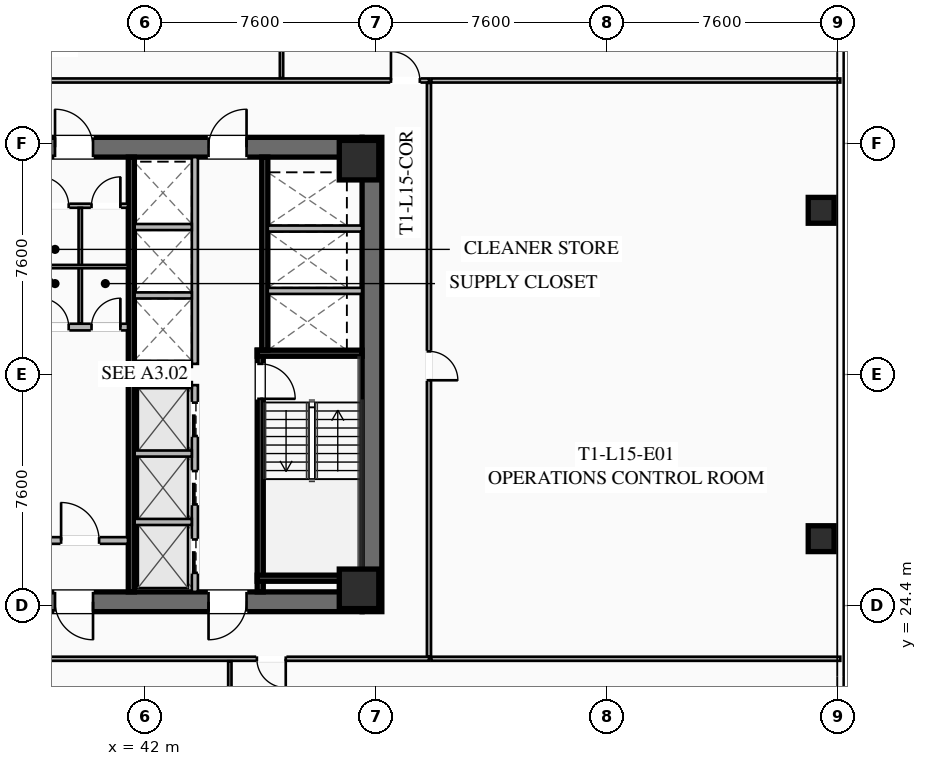
"""IFC4 building model, lengths in metres.
Left out: names, types, materials, properties, quantities, classifications, styles, units other than length and angle.
Written with IfcOpenShell. Run it as: python <this file> out.ifc"""

import sys

from ifc_helpers import new_model, si_unit, direction, frame, frame_2d, origin, origin_2d, place, context, subcontext, project, spatial, rectangle, hollow_rectangle, extrude, element, fill, save


model = new_model("IFC4")
c1 = context("Model", 3, precision=1e-05, world=origin(), true_north=direction((0.0, 1.0)))
c2 = subcontext(c1, "Body", "Model", "MODEL_VIEW")
j1 = project(units=[si_unit("LENGTHUNIT", "METRE"), si_unit("PLANEANGLEUNIT", "RADIAN")], contexts=[c1])
p1 = place(None, origin())
s1 = spatial("IfcSite", under=j1, at=p1, CompositionType="ELEMENT")
p2 = place(p1, origin())
s2 = spatial("IfcBuilding", under=s1, at=p2, CompositionType="ELEMENT")
p3 = place(p2, frame((0.0, 0.0, 60.1)))
s3 = spatial("IfcBuildingStorey", under=s2, at=p3, CompositionType="ELEMENT", Elevation=60.1)
p4 = place(p3, frame((49.475, 39.8, 0.0), z_axis=(0.0, 0.0, 1.0), x_axis=(0.0, -1.0, 0.0)))
e1 = element("IfcWall", 1, at=p4, inside=s3, PredefinedType="SHEAR", context=c2, shape_type="SweptSolid", body=[
    extrude(rectangle(XDim=15.6, YDim=0.65, at=frame_2d((7.8, 0.0))), origin(), (0.0, 0.0, 1.0), 3.55),
])
p5 = place(p3, frame((49.15, 24.525, 0.0), z_axis=(0.0, 0.0, 1.0), x_axis=(-1.0, 0.0, 0.0)))
e2 = element("IfcWall", 2, at=p5, inside=s3, PredefinedType="SHEAR", context=c2, shape_type="SweptSolid", body=[
    extrude(rectangle(XDim=14.3, YDim=0.65, at=frame_2d((7.15, 0.0))), origin(), (0.0, 0.0, 1.0), 3.55),
])
p6 = place(p5, frame((8.85, 0.0, 0.0)))
e3 = element("IfcOpeningElement", 3, at=p6, cuts=e2, PredefinedType="OPENING", context=c2, shape_type="SweptSolid", body=[
    extrude(rectangle(XDim=1.25, YDim=2.25, at=frame_2d((0.625, 1.125))), frame((0.0, 0.335, 0.0), z_axis=(0.0, -1.0, 0.0), x_axis=(1.0, 0.0, 0.0)), (0.0, 0.0, 1.0), 0.67),
])
p7 = place(p5, frame((3.8, 0.0, 0.0)))
e4 = element("IfcOpeningElement", 4, at=p7, cuts=e2, PredefinedType="OPENING", context=c2, shape_type="SweptSolid", body=[
    extrude(rectangle(XDim=1.25, YDim=2.25, at=frame_2d((0.625, 1.125))), frame((0.0, 0.335, 0.0), z_axis=(0.0, -1.0, 0.0), x_axis=(1.0, 0.0, 0.0)), (0.0, 0.0, 1.0), 0.67),
])
p8 = place(p3, frame((34.85, 39.475, 0.0), z_axis=(0.0, 0.0, 1.0), x_axis=(1.0, 0.0, 0.0)))
e5 = element("IfcWall", 5, at=p8, inside=s3, PredefinedType="SHEAR", context=c2, shape_type="SweptSolid", body=[
    extrude(rectangle(XDim=14.3, YDim=0.65, at=frame_2d((7.15, 0.0))), origin(), (0.0, 0.0, 1.0), 3.55),
])
p9 = place(p8, frame((4.2, 0.0, 0.0)))
e6 = element("IfcOpeningElement", 6, at=p9, cuts=e5, PredefinedType="OPENING", context=c2, shape_type="SweptSolid", body=[
    extrude(rectangle(XDim=1.25, YDim=2.25, at=frame_2d((0.625, 1.125))), frame((0.0, 0.335, 0.0), z_axis=(0.0, -1.0, 0.0), x_axis=(1.0, 0.0, 0.0)), (0.0, 0.0, 1.0), 0.67),
])
p10 = place(p8, frame((9.25, 0.0, 0.0)))
e7 = element("IfcOpeningElement", 7, at=p10, cuts=e5, PredefinedType="OPENING", context=c2, shape_type="SweptSolid", body=[
    extrude(rectangle(XDim=1.25, YDim=2.25, at=frame_2d((0.625, 1.125))), frame((0.0, 0.335, 0.0), z_axis=(0.0, -1.0, 0.0), x_axis=(1.0, 0.0, 0.0)), (0.0, 0.0, 1.0), 0.67),
])
for number, where, z_axis, x_axis in (
    (8, (49.05, 24.95, 0.0), (0.0, 0.0, 1.0), (1.0, 0.0, 0.0)),
    (9, (49.05, 39.05, 0.0), (0.0, 0.0, 1.0), (1.0, 0.0, 0.0)),
):
    element("IfcColumn", number, at=place(p3, frame(where, z_axis=z_axis, x_axis=x_axis)), inside=s3, PredefinedType="COLUMN", context=c2, shape_type="SweptSolid", body=[
        extrude(hollow_rectangle(XDim=1.3, YDim=1.3, WallThickness=0.05, at=origin_2d()), origin(), (0.0, 0.0, 1.0), 3.35),
    ])
for number, where, z_axis, x_axis in (
    (10, (64.25, 26.6, 0.0), (0.0, 0.0, 1.0), (1.0, 0.0, 0.0)),
    (11, (64.25, 37.4, 0.0), (0.0, 0.0, 1.0), (1.0, 0.0, 0.0)),
):
    element("IfcColumn", number, at=place(p3, frame(where, z_axis=z_axis, x_axis=x_axis)), inside=s3, PredefinedType="COLUMN", context=c2, shape_type="SweptSolid", body=[
        extrude(hollow_rectangle(XDim=0.85, YDim=0.85, WallThickness=0.035, at=origin_2d()), origin(), (0.0, 0.0, 1.0), 3.35),
    ])
p11 = place(p3, frame((45.8, 32.8, 0.0), z_axis=(0.0, 0.0, 1.0), x_axis=(0.0, -1.0, 0.0)))
e12 = element("IfcWall", 12, at=p11, inside=s3, PredefinedType="SHEAR", context=c2, shape_type="SweptSolid", body=[
    extrude(rectangle(XDim=7.95, YDim=0.2, at=frame_2d((3.975, 0.0))), origin(), (0.0, 0.0, 1.0), 3.35),
])
p12 = place(p11, frame((0.45, 0.0, 0.0)))
e13 = element("IfcOpeningElement", 13, at=p12, cuts=e12, PredefinedType="OPENING", context=c2, shape_type="SweptSolid", body=[
    extrude(rectangle(XDim=1.15, YDim=2.2, at=frame_2d((0.575, 1.1))), frame((0.0, 0.11, 0.0), z_axis=(0.0, -1.0, 0.0), x_axis=(1.0, 0.0, 0.0)), (0.0, 0.0, 1.0), 0.22),
])
for number, where, z_axis, x_axis in (
    (14, (45.7, 32.7, 0.0), (0.0, 0.0, 1.0), (1.0, 0.0, 0.0)),
    (15, (45.7, 25.3, 0.0), (0.0, 0.0, 1.0), (1.0, 0.0, 0.0)),
):
    element("IfcWall", number, at=place(p3, frame(where, z_axis=z_axis, x_axis=x_axis)), inside=s3, PredefinedType="SHEAR", context=c2, shape_type="SweptSolid", body=[
        extrude(rectangle(XDim=3.45, YDim=0.2, at=frame_2d((1.725, 0.0))), origin(), (0.0, 0.0, 1.0), 3.35),
    ])
p13 = place(p3, frame((41.56, 24.85, 0.0), z_axis=(0.0, 0.0, 1.0), x_axis=(0.0, 1.0, 0.0)))
e16 = element("IfcWall", 16, at=p13, inside=s3, PredefinedType="SHEAR", context=c2, shape_type="SweptSolid", body=[
    extrude(rectangle(XDim=14.3, YDim=0.2, at=frame_2d((7.15, 0.0))), origin(), (0.0, 0.0, 1.0), 3.35),
])
p14 = place(p3, frame((38.3, 33.56, 0.0), z_axis=(0.0, 0.0, 1.0), x_axis=(1.0, 0.0, 0.0)))
e17 = element("IfcWall", 17, at=p14, inside=s3, PredefinedType="SOLIDWALL", context=c2, shape_type="SweptSolid", body=[
    extrude(rectangle(XDim=3.15, YDim=0.22, at=frame_2d((1.575, 0.0))), origin(), (0.0, 0.0, 1.0), 2.703),
])
p15 = place(p14, frame((0.25, 0.0, 0.0)))
e18 = element("IfcOpeningElement", 18, at=p15, cuts=e17, PredefinedType="OPENING", context=c2, shape_type="SweptSolid", body=[
    extrude(rectangle(XDim=0.95, YDim=2.05, at=frame_2d((0.475, 1.025))), frame((0.0, 0.12, 0.0), z_axis=(0.0, -1.0, 0.0), x_axis=(1.0, 0.0, 0.0)), (0.0, 0.0, 1.0), 0.24),
])
p16 = place(p14, frame((1.95, 0.0, 0.0)))
e19 = element("IfcOpeningElement", 19, at=p16, cuts=e17, PredefinedType="OPENING", context=c2, shape_type="SweptSolid", body=[
    extrude(rectangle(XDim=0.95, YDim=2.05, at=frame_2d((0.475, 1.025))), frame((0.0, 0.12, 0.0), z_axis=(0.0, -1.0, 0.0), x_axis=(1.0, 0.0, 0.0)), (0.0, 0.0, 1.0), 0.24),
])
p17 = place(p3, frame((38.3, 26.54, 0.0), z_axis=(0.0, 0.0, 1.0), x_axis=(1.0, 0.0, 0.0)))
e20 = element("IfcWall", 20, at=p17, inside=s3, PredefinedType="SOLIDWALL", context=c2, shape_type="SweptSolid", body=[
    extrude(rectangle(XDim=3.15, YDim=0.22, at=frame_2d((1.575, 0.0))), origin(), (0.0, 0.0, 1.0), 2.703),
])
p18 = place(p17, frame((0.95, 0.0, 0.0)))
e21 = element("IfcOpeningElement", 21, at=p18, cuts=e20, PredefinedType="OPENING", context=c2, shape_type="SweptSolid", body=[
    extrude(rectangle(XDim=1.25, YDim=2.25, at=frame_2d((0.625, 1.125))), frame((0.0, 0.12, 0.0), z_axis=(0.0, -1.0, 0.0), x_axis=(1.0, 0.0, 0.0)), (0.0, 0.0, 1.0), 0.24),
])
p19 = place(p3, frame((45.95, 39.15, 0.0), z_axis=(0.0, 0.0, 1.0), x_axis=(0.0, -1.0, 0.0)))
e22 = element("IfcWall", 22, at=p19, inside=s3, PredefinedType="SHEAR", context=c2, shape_type="SweptSolid", body=[
    extrude(rectangle(XDim=6.35, YDim=0.2, at=frame_2d((3.175, 0.0))), origin(), (0.0, 0.0, 1.0), 3.35),
])
for number, where, z_axis, x_axis in (
    (23, (46.05, 34.75, 0.0), (0.0, 0.0, 1.0), (1.0, 0.0, 0.0)),
    (24, (46.05, 36.8, 0.0), (0.0, 0.0, 1.0), (1.0, 0.0, 0.0)),
):
    element("IfcWall", number, at=place(p3, frame(where, z_axis=z_axis, x_axis=x_axis)), inside=s3, PredefinedType="SOLIDWALL", context=c2, shape_type="SweptSolid", body=[
        extrude(rectangle(XDim=3.1, YDim=0.2, at=frame_2d((1.55, 0.0))), origin(), (0.0, 0.0, 1.0), 3.35),
    ])
p20 = place(p3, frame((38.3, 37.55, 0.0), z_axis=(0.0, 0.0, 1.0), x_axis=(1.0, 0.0, 0.0)))
e25 = element("IfcWall", 25, at=p20, inside=s3, PredefinedType="PARTITIONING", context=c2, shape_type="SweptSolid", body=[
    extrude(rectangle(XDim=3.15, YDim=0.135, at=frame_2d((1.575, 0.0))), origin(), (0.0, 0.0, 1.0), 2.703),
])
p21 = place(p20, frame((0.25, 0.0, 0.0)))
e26 = element("IfcOpeningElement", 26, at=p21, cuts=e25, PredefinedType="OPENING", context=c2, shape_type="SweptSolid", body=[
    extrude(rectangle(XDim=0.95, YDim=2.05, at=frame_2d((0.475, 1.025))), frame((0.0, 0.077, 0.0), z_axis=(0.0, -1.0, 0.0), x_axis=(1.0, 0.0, 0.0)), (0.0, 0.0, 1.0), 0.155),
])
p22 = place(p20, frame((1.95, 0.0, 0.0)))
e27 = element("IfcOpeningElement", 27, at=p22, cuts=e25, PredefinedType="OPENING", context=c2, shape_type="SweptSolid", body=[
    extrude(rectangle(XDim=0.95, YDim=2.05, at=frame_2d((0.475, 1.025))), frame((0.0, 0.077, 0.0), z_axis=(0.0, -1.0, 0.0), x_axis=(1.0, 0.0, 0.0)), (0.0, 0.0, 1.0), 0.155),
])
p23 = place(p3, frame((39.88, 33.68, 0.0), z_axis=(0.0, 0.0, 1.0), x_axis=(0.0, 1.0, 0.0)))
e28 = element("IfcWall", 28, at=p23, inside=s3, PredefinedType="PARTITIONING", context=c2, shape_type="SweptSolid", body=[
    extrude(rectangle(XDim=3.8, YDim=0.11, at=frame_2d((1.9, 0.0))), origin(), (0.0, 0.0, 1.0), 2.703),
])
p24 = place(p3, frame((38.3, 35.55, 0.0), z_axis=(0.0, 0.0, 1.0), x_axis=(1.0, 0.0, 0.0)))
e29 = element("IfcWall", 29, at=p24, inside=s3, PredefinedType="PARTITIONING", context=c2, shape_type="SweptSolid", body=[
    extrude(rectangle(XDim=3.15, YDim=0.11, at=frame_2d((1.575, 0.0))), origin(), (0.0, 0.0, 1.0), 2.703),
])
p25 = place(p3, frame((43.65, 24.85, 0.0), z_axis=(0.0, 0.0, 1.0), x_axis=(0.0, 1.0, 0.0)))
e30 = element("IfcWall", 30, at=p25, inside=s3, PredefinedType="SOLIDWALL", context=c2, shape_type="SweptSolid", body=[
    extrude(rectangle(XDim=6.8, YDim=0.2, at=frame_2d((3.4, 0.0))), origin(), (0.0, 0.0, 1.0), 3.35),
])
p26 = place(p25, frame((0.625, 0.0, 0.0)))
e31 = element("IfcOpeningElement", 31, at=p26, cuts=e30, PredefinedType="OPENING", context=c2, shape_type="SweptSolid", body=[
    extrude(rectangle(XDim=1.1, YDim=2.2, at=frame_2d((0.55, 1.1))), frame((0.0, 0.11, 0.0), z_axis=(0.0, -1.0, 0.0), x_axis=(1.0, 0.0, 0.0)), (0.0, 0.0, 1.0), 0.22),
])
p27 = place(p25, frame((2.875, 0.0, 0.0)))
e32 = element("IfcOpeningElement", 32, at=p27, cuts=e30, PredefinedType="OPENING", context=c2, shape_type="SweptSolid", body=[
    extrude(rectangle(XDim=1.1, YDim=2.2, at=frame_2d((0.55, 1.1))), frame((0.0, 0.11, 0.0), z_axis=(0.0, -1.0, 0.0), x_axis=(1.0, 0.0, 0.0)), (0.0, 0.0, 1.0), 0.22),
])
p28 = place(p25, frame((5.125, 0.0, 0.0)))
e33 = element("IfcOpeningElement", 33, at=p28, cuts=e30, PredefinedType="OPENING", context=c2, shape_type="SweptSolid", body=[
    extrude(rectangle(XDim=1.1, YDim=2.2, at=frame_2d((0.55, 1.1))), frame((0.0, 0.11, 0.0), z_axis=(0.0, -1.0, 0.0), x_axis=(1.0, 0.0, 0.0)), (0.0, 0.0, 1.0), 0.22),
])
for number, where, z_axis, x_axis in (
    (34, (41.67, 27.15, 0.0), (0.0, 0.0, 1.0), (1.0, 0.0, 0.0)),
    (35, (41.67, 29.4, 0.0), (0.0, 0.0, 1.0), (1.0, 0.0, 0.0)),
    (36, (41.67, 31.65, 0.0), (0.0, 0.0, 1.0), (1.0, 0.0, 0.0)),
):
    element("IfcWall", number, at=place(p3, frame(where, z_axis=z_axis, x_axis=x_axis)), inside=s3, PredefinedType="SOLIDWALL", context=c2, shape_type="SweptSolid", body=[
        extrude(rectangle(XDim=1.88, YDim=0.2, at=frame_2d((0.94, 0.0))), origin(), (0.0, 0.0, 1.0), 3.35),
    ])
p29 = place(p3, frame((43.65, 32.35, 0.0), z_axis=(0.0, 0.0, 1.0), x_axis=(0.0, 1.0, 0.0)))
e37 = element("IfcWall", 37, at=p29, inside=s3, PredefinedType="SOLIDWALL", context=c2, shape_type="SweptSolid", body=[
    extrude(rectangle(XDim=6.8, YDim=0.2, at=frame_2d((3.4, 0.0))), origin(), (0.0, 0.0, 1.0), 3.35),
])
for number, where, z_axis, x_axis in (
    (38, (41.67, 32.35, 0.0), (0.0, 0.0, 1.0), (1.0, 0.0, 0.0)),
    (39, (41.67, 34.6, 0.0), (0.0, 0.0, 1.0), (1.0, 0.0, 0.0)),
    (40, (41.67, 36.85, 0.0), (0.0, 0.0, 1.0), (1.0, 0.0, 0.0)),
):
    element("IfcWall", number, at=place(p3, frame(where, z_axis=z_axis, x_axis=x_axis)), inside=s3, PredefinedType="SOLIDWALL", context=c2, shape_type="SweptSolid", body=[
        extrude(rectangle(XDim=1.88, YDim=0.2, at=frame_2d((0.94, 0.0))), origin(), (0.0, 0.0, 1.0), 3.35),
    ])
p30 = place(p3, frame((22.35, 41.67, 0.0), z_axis=(0.0, 0.0, 1.0), x_axis=(1.0, 0.0, 0.0)))
e41 = element("IfcWall", 41, at=p30, inside=s3, PredefinedType="PARTITIONING", context=c2, shape_type="SweptSolid", body=[
    extrude(rectangle(XDim=29.0, YDim=0.135, at=frame_2d((14.5, 0.0))), origin(), (0.0, 0.0, 1.0), 2.703),
])
p31 = place(p30, frame((0.3, 0.0, 0.0)))
e42 = element("IfcOpeningElement", 42, at=p31, cuts=e41, PredefinedType="OPENING", context=c2, shape_type="SweptSolid", body=[
    extrude(rectangle(XDim=0.95, YDim=2.05, at=frame_2d((0.475, 1.025))), frame((0.0, 0.077, 0.0), z_axis=(0.0, -1.0, 0.0), x_axis=(1.0, 0.0, 0.0)), (0.0, 0.0, 1.0), 0.155),
])
p32 = place(p30, frame((27.75, 0.0, 0.0)))
e43 = element("IfcOpeningElement", 43, at=p32, cuts=e41, PredefinedType="OPENING", context=c2, shape_type="SweptSolid", body=[
    extrude(rectangle(XDim=0.95, YDim=2.05, at=frame_2d((0.475, 1.025))), frame((0.0, 0.077, 0.0), z_axis=(0.0, -1.0, 0.0), x_axis=(1.0, 0.0, 0.0)), (0.0, 0.0, 1.0), 0.155),
])
p33 = place(p3, frame((46.5, 41.75, 0.0), z_axis=(0.0, 0.0, 1.0), x_axis=(0.0, 1.0, 0.0)))
e44 = element("IfcWall", 44, at=p33, inside=s3, PredefinedType="PARTITIONING", context=c2, shape_type="SweptSolid", body=[
    extrude(rectangle(XDim=13.13, YDim=0.11, at=frame_2d((6.565, 0.0))), origin(), (0.0, 0.0, 1.0), 2.703),
])
p34 = place(p3, frame((51.35, 22.65, 0.0), z_axis=(0.0, 0.0, 1.0), x_axis=(-1.0, 0.0, 0.0)))
e45 = element("IfcWall", 45, at=p34, inside=s3, PredefinedType="PARTITIONING", context=c2, shape_type="SweptSolid", body=[
    extrude(rectangle(XDim=29.0, YDim=0.135, at=frame_2d((14.5, 0.0))), origin(), (0.0, 0.0, 1.0), 2.703),
])
p35 = place(p34, frame((27.67, 0.0, 0.0)))
e46 = element("IfcOpeningElement", 46, at=p35, cuts=e45, PredefinedType="OPENING", context=c2, shape_type="SweptSolid", body=[
    extrude(rectangle(XDim=0.95, YDim=2.05, at=frame_2d((0.475, 1.025))), frame((0.0, 0.077, 0.0), z_axis=(0.0, -1.0, 0.0), x_axis=(1.0, 0.0, 0.0)), (0.0, 0.0, 1.0), 0.155),
])
p36 = place(p34, frame((4.71, 0.0, 0.0)))
e47 = element("IfcOpeningElement", 47, at=p36, cuts=e45, PredefinedType="OPENING", context=c2, shape_type="SweptSolid", body=[
    extrude(rectangle(XDim=0.95, YDim=2.05, at=frame_2d((0.475, 1.025))), frame((0.0, 0.077, 0.0), z_axis=(0.0, -1.0, 0.0), x_axis=(1.0, 0.0, 0.0)), (0.0, 0.0, 1.0), 0.155),
])
p37 = place(p3, frame((44.8, 9.27, 0.0), z_axis=(0.0, 0.0, 1.0), x_axis=(0.0, 1.0, 0.0)))
e48 = element("IfcWall", 48, at=p37, inside=s3, PredefinedType="PARTITIONING", context=c2, shape_type="SweptSolid", body=[
    extrude(rectangle(XDim=13.3, YDim=0.11, at=frame_2d((6.65, 0.0))), origin(), (0.0, 0.0, 1.0), 2.703),
])
p38 = place(p3, frame((51.35, 41.59, 0.0), z_axis=(0.0, 0.0, 1.0), x_axis=(0.0, -1.0, 0.0)))
e49 = element("IfcWall", 49, at=p38, inside=s3, PredefinedType="PARTITIONING", context=c2, shape_type="SweptSolid", body=[
    extrude(rectangle(XDim=18.86, YDim=0.135, at=frame_2d((9.43, 0.0))), origin(), (0.0, 0.0, 1.0), 2.703),
])
p39 = place(p38, frame((8.83, 0.0, 0.0)))
e50 = element("IfcOpeningElement", 50, at=p39, cuts=e49, PredefinedType="OPENING", context=c2, shape_type="SweptSolid", body=[
    extrude(rectangle(XDim=0.95, YDim=2.05, at=frame_2d((0.475, 1.025))), frame((0.0, 0.077, 0.0), z_axis=(0.0, -1.0, 0.0), x_axis=(1.0, 0.0, 0.0)), (0.0, 0.0, 1.0), 0.155),
])
for number, where, z_axis, x_axis in (
    (51, (64.88, 41.67, 0.0), (0.0, 0.0, 1.0), (-1.0, 0.0, 0.0)),
    (52, (51.43, 22.65, 0.0), (0.0, 0.0, 1.0), (1.0, 0.0, 0.0)),
):
    element("IfcWall", number, at=place(p3, frame(where, z_axis=z_axis, x_axis=x_axis)), inside=s3, PredefinedType="PARTITIONING", context=c2, shape_type="SweptSolid", body=[
        extrude(rectangle(XDim=13.45, YDim=0.135, at=frame_2d((6.725, 0.0))), origin(), (0.0, 0.0, 1.0), 2.703),
    ])
p40 = place(p9, origin())
e53 = element("IfcDoor", 53, at=p40, inside=s3, OperationType="SINGLE_SWING_LEFT", PredefinedType="DOOR", context=c2, shape_type="SweptSolid", body=[
    extrude(rectangle(XDim=1.25, YDim=2.25, at=frame_2d((0.625, 1.125))), frame((0.0, 0.025, 0.0), z_axis=(0.0, -1.0, 0.0), x_axis=(1.0, 0.0, 0.0)), (0.0, 0.0, 1.0), 0.05),
])
fill(e6, e53)
p41 = place(p10, origin())
e54 = element("IfcDoor", 54, at=p41, inside=s3, OperationType="SINGLE_SWING_RIGHT", PredefinedType="DOOR", context=c2, shape_type="SweptSolid", body=[
    extrude(rectangle(XDim=1.25, YDim=2.25, at=frame_2d((0.625, 1.125))), frame((0.0, 0.025, 0.0), z_axis=(0.0, -1.0, 0.0), x_axis=(1.0, 0.0, 0.0)), (0.0, 0.0, 1.0), 0.05),
])
fill(e7, e54)
p42 = place(p6, origin())
e55 = element("IfcDoor", 55, at=p42, inside=s3, OperationType="SINGLE_SWING_LEFT", PredefinedType="DOOR", context=c2, shape_type="SweptSolid", body=[
    extrude(rectangle(XDim=1.25, YDim=2.25, at=frame_2d((0.625, 1.125))), frame((0.0, 0.025, 0.0), z_axis=(0.0, -1.0, 0.0), x_axis=(1.0, 0.0, 0.0)), (0.0, 0.0, 1.0), 0.05),
])
fill(e3, e55)
p43 = place(p7, origin())
e56 = element("IfcDoor", 56, at=p43, inside=s3, OperationType="SINGLE_SWING_RIGHT", PredefinedType="DOOR", context=c2, shape_type="SweptSolid", body=[
    extrude(rectangle(XDim=1.25, YDim=2.25, at=frame_2d((0.625, 1.125))), frame((0.0, 0.025, 0.0), z_axis=(0.0, -1.0, 0.0), x_axis=(1.0, 0.0, 0.0)), (0.0, 0.0, 1.0), 0.05),
])
fill(e4, e56)
p44 = place(p12, origin())
e57 = element("IfcDoor", 57, at=p44, inside=s3, OperationType="SINGLE_SWING_RIGHT", PredefinedType="DOOR", context=c2, shape_type="SweptSolid", body=[
    extrude(rectangle(XDim=1.15, YDim=2.2, at=frame_2d((0.575, 1.1))), frame((0.0, 0.025, 0.0), z_axis=(0.0, -1.0, 0.0), x_axis=(1.0, 0.0, 0.0)), (0.0, 0.0, 1.0), 0.05),
])
fill(e13, e57)
p45 = place(p18, origin())
e58 = element("IfcDoor", 58, at=p45, inside=s3, OperationType="SINGLE_SWING_LEFT", PredefinedType="DOOR", context=c2, shape_type="SweptSolid", body=[
    extrude(rectangle(XDim=1.25, YDim=2.25, at=frame_2d((0.625, 1.125))), frame((0.0, 0.025, 0.0), z_axis=(0.0, -1.0, 0.0), x_axis=(1.0, 0.0, 0.0)), (0.0, 0.0, 1.0), 0.05),
])
fill(e21, e58)
p46 = place(p21, origin())
e59 = element("IfcDoor", 59, at=p46, inside=s3, OperationType="SINGLE_SWING_LEFT", PredefinedType="DOOR", context=c2, shape_type="SweptSolid", body=[
    extrude(rectangle(XDim=0.95, YDim=2.05, at=frame_2d((0.475, 1.025))), frame((0.0, 0.025, 0.0), z_axis=(0.0, -1.0, 0.0), x_axis=(1.0, 0.0, 0.0)), (0.0, 0.0, 1.0), 0.05),
])
fill(e26, e59)
p47 = place(p22, origin())
e60 = element("IfcDoor", 60, at=p47, inside=s3, OperationType="SINGLE_SWING_RIGHT", PredefinedType="DOOR", context=c2, shape_type="SweptSolid", body=[
    extrude(rectangle(XDim=0.95, YDim=2.05, at=frame_2d((0.475, 1.025))), frame((0.0, 0.025, 0.0), z_axis=(0.0, -1.0, 0.0), x_axis=(1.0, 0.0, 0.0)), (0.0, 0.0, 1.0), 0.05),
])
fill(e27, e60)
p48 = place(p15, origin())
e61 = element("IfcDoor", 61, at=p48, inside=s3, OperationType="SINGLE_SWING_LEFT", PredefinedType="DOOR", context=c2, shape_type="SweptSolid", body=[
    extrude(rectangle(XDim=0.95, YDim=2.05, at=frame_2d((0.475, 1.025))), frame((0.0, 0.025, 0.0), z_axis=(0.0, -1.0, 0.0), x_axis=(1.0, 0.0, 0.0)), (0.0, 0.0, 1.0), 0.05),
])
fill(e18, e61)
p49 = place(p16, origin())
e62 = element("IfcDoor", 62, at=p49, inside=s3, OperationType="SINGLE_SWING_RIGHT", PredefinedType="DOOR", context=c2, shape_type="SweptSolid", body=[
    extrude(rectangle(XDim=0.95, YDim=2.05, at=frame_2d((0.475, 1.025))), frame((0.0, 0.025, 0.0), z_axis=(0.0, -1.0, 0.0), x_axis=(1.0, 0.0, 0.0)), (0.0, 0.0, 1.0), 0.05),
])
fill(e19, e62)
p50 = place(p32, origin())
e63 = element("IfcDoor", 63, at=p50, inside=s3, OperationType="SINGLE_SWING_LEFT", PredefinedType="DOOR", context=c2, shape_type="SweptSolid", body=[
    extrude(rectangle(XDim=0.95, YDim=2.05, at=frame_2d((0.475, 1.025))), frame((0.0, 0.025, 0.0), z_axis=(0.0, -1.0, 0.0), x_axis=(1.0, 0.0, 0.0)), (0.0, 0.0, 1.0), 0.05),
])
fill(e43, e63)
p51 = place(p36, origin())
e64 = element("IfcDoor", 64, at=p51, inside=s3, OperationType="SINGLE_SWING_LEFT", PredefinedType="DOOR", context=c2, shape_type="SweptSolid", body=[
    extrude(rectangle(XDim=0.95, YDim=2.05, at=frame_2d((0.475, 1.025))), frame((0.0, 0.025, 0.0), z_axis=(0.0, -1.0, 0.0), x_axis=(1.0, 0.0, 0.0)), (0.0, 0.0, 1.0), 0.05),
])
fill(e47, e64)
p52 = place(p39, origin())
e65 = element("IfcDoor", 65, at=p52, inside=s3, OperationType="SINGLE_SWING_RIGHT", PredefinedType="DOOR", context=c2, shape_type="SweptSolid", body=[
    extrude(rectangle(XDim=0.95, YDim=2.05, at=frame_2d((0.475, 1.025))), frame((0.0, 0.025, 0.0), z_axis=(0.0, -1.0, 0.0), x_axis=(1.0, 0.0, 0.0)), (0.0, 0.0, 1.0), 0.05),
])
fill(e50, e65)
p53 = place(p26, origin())
e66 = element("IfcDoor", 66, at=p53, inside=s3, OperationType="SLIDING_TO_LEFT", PredefinedType="DOOR", context=c2, shape_type="SweptSolid", body=[
    extrude(rectangle(XDim=1.1, YDim=2.2, at=frame_2d((0.55, 1.1))), frame((0.0, 0.025, 0.0), z_axis=(0.0, -1.0, 0.0), x_axis=(1.0, 0.0, 0.0)), (0.0, 0.0, 1.0), 0.05),
])
fill(e31, e66)
p54 = place(p27, origin())
e67 = element("IfcDoor", 67, at=p54, inside=s3, OperationType="SLIDING_TO_LEFT", PredefinedType="DOOR", context=c2, shape_type="SweptSolid", body=[
    extrude(rectangle(XDim=1.1, YDim=2.2, at=frame_2d((0.55, 1.1))), frame((0.0, 0.025, 0.0), z_axis=(0.0, -1.0, 0.0), x_axis=(1.0, 0.0, 0.0)), (0.0, 0.0, 1.0), 0.05),
])
fill(e32, e67)
p55 = place(p28, origin())
e68 = element("IfcDoor", 68, at=p55, inside=s3, OperationType="SLIDING_TO_LEFT", PredefinedType="DOOR", context=c2, shape_type="SweptSolid", body=[
    extrude(rectangle(XDim=1.1, YDim=2.2, at=frame_2d((0.55, 1.1))), frame((0.0, 0.025, 0.0), z_axis=(0.0, -1.0, 0.0), x_axis=(1.0, 0.0, 0.0)), (0.0, 0.0, 1.0), 0.05),
])
fill(e33, e68)
save(model, sys.argv[1])
